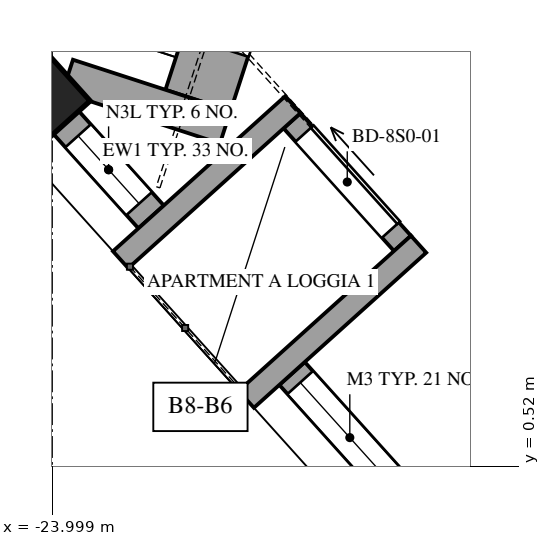
"""IFC4 building model, lengths in metres.
Left out: names, types, materials, properties, quantities, classifications, styles, units other than length and angle.
Written with IfcOpenShell. Run it as: python <this file> out.ifc"""

import sys

from ifc_helpers import new_model, si_unit, direction, frame, frame_2d, origin, origin_2d, place, context, subcontext, project, spatial, rectangle, extrude, element, fill, save


model = new_model("IFC4")
c1 = context("Model", 3, precision=1e-05, world=origin(), true_north=direction((0.0, 1.0)))
c2 = subcontext(c1, "Body", "Model", "MODEL_VIEW")
j1 = project(units=[si_unit("LENGTHUNIT", "METRE"), si_unit("PLANEANGLEUNIT", "RADIAN")], contexts=[c1])
p1 = place(None, origin())
s1 = spatial("IfcSite", under=j1, at=p1, CompositionType="ELEMENT")
p2 = place(p1, origin())
s2 = spatial("IfcBuilding", under=s1, at=p2, CompositionType="ELEMENT")
p3 = place(p2, frame((0.0, 0.0, 320.4)))
s3 = spatial("IfcBuildingStorey", under=s2, at=p3, CompositionType="ELEMENT", Elevation=320.4)
p4 = place(p3, frame((-24.278, 5.368, -0.35), z_axis=(0.0, 0.0, 1.0), x_axis=(0.669130606359, -0.743144825477, 0.0)))
e1 = element("IfcColumn", 1, at=p4, inside=s3, PredefinedType="COLUMN", context=c2, shape_type="SweptSolid", body=[
    extrude(rectangle(XDim=1.1, YDim=1.1, at=origin_2d()), origin(), (0.0, 0.0, 1.0), 4.35),
])
p5 = place(p3, frame((-23.817, 5.043, 0.0), z_axis=(0.0, 0.0, 1.0), x_axis=(0.669182609054, -0.743097998746, 0.0)))
e2 = element("IfcWall", 2, at=p5, inside=s3, PredefinedType="SOLIDWALL", context=c2, shape_type="SweptSolid", body=[
    extrude(rectangle(XDim=1.671, YDim=0.45, at=frame_2d((0.836, 0.0))), origin(), (0.0, 0.0, 1.0), 3.3),
])
p6 = place(p5, frame((0.236, 0.0, 0.4)))
e3 = element("IfcOpeningElement", 3, at=p6, cuts=e2, PredefinedType="OPENING", context=c2, shape_type="SweptSolid", body=[
    extrude(rectangle(XDim=1.2, YDim=2.1, at=frame_2d((0.6, 1.05))), frame((0.0, 0.235, 0.0), z_axis=(0.0, -1.0, 0.0), x_axis=(1.0, 0.0, 0.0)), (0.0, 0.0, 1.0), 0.47),
])
p7 = place(p3, frame((-20.844, 1.742, 0.0), z_axis=(0.0, 0.0, 1.0), x_axis=(0.669160694992, -0.743117732447, 0.0)))
e4 = element("IfcWall", 4, at=p7, inside=s3, PredefinedType="SOLIDWALL", context=c2, shape_type="SweptSolid", body=[
    extrude(rectangle(XDim=2.271, YDim=0.45, at=frame_2d((1.136, 0.0))), origin(), (0.0, 0.0, 1.0), 3.3),
])
p8 = place(p7, frame((0.161, 0.0, 0.4)))
e5 = element("IfcOpeningElement", 5, at=p8, cuts=e4, PredefinedType="OPENING", context=c2, shape_type="SweptSolid", body=[
    extrude(rectangle(XDim=1.95, YDim=2.75, at=frame_2d((0.975, 1.375))), frame((0.0, 0.235, 0.0), z_axis=(0.0, -1.0, 0.0), x_axis=(1.0, 0.0, 0.0)), (0.0, 0.0, 1.0), 0.47),
])
p9 = place(p3, frame((-20.844, 5.067, 0.0), z_axis=(0.0, 0.0, 1.0), x_axis=(0.669144868344, -0.743131983681, 0.0)))
e6 = element("IfcWall", 6, at=p9, inside=s3, PredefinedType="SOLIDWALL", context=c2, shape_type="SweptSolid", body=[
    extrude(rectangle(XDim=2.171, YDim=0.3, at=frame_2d((1.085, 0.0))), origin(), (0.0, 0.0, 1.0), 3.3),
])
p10 = place(p9, frame((0.236, 0.0, 0.0)))
e7 = element("IfcOpeningElement", 7, at=p10, cuts=e6, PredefinedType="OPENING", context=c2, shape_type="SweptSolid", body=[
    extrude(rectangle(XDim=1.7, YDim=2.5, at=frame_2d((0.85, 1.25))), frame((0.0, 0.16, 0.0), z_axis=(0.0, -1.0, 0.0), x_axis=(1.0, 0.0, 0.0)), (0.0, 0.0, 1.0), 0.32),
])
for number, where, z_axis, x_axis in (
    (8, (-23.1, 3.238, 0.0), (0.0, 0.0, 1.0), (0.743, 0.669, 0.0)),
    (9, (-21.447, 1.402, 0.0), (0.0, 0.0, 1.0), (0.743, 0.669, 0.0)),
):
    element("IfcWall", number, at=place(p3, frame(where, z_axis=z_axis, x_axis=x_axis)), inside=s3, PredefinedType="SOLIDWALL", context=c2, shape_type="SweptSolid", body=[
        extrude(rectangle(XDim=3.05, YDim=0.3, at=frame_2d((1.525, 0.0))), origin(), (0.0, 0.0, 1.0), 3.3),
    ])
p11 = place(p3, frame((-22.082, 5.335, 0.0), z_axis=(0.0, 0.0, 1.0), x_axis=(0.309019824916, 0.951055596592, 0.0)))
e10 = element("IfcWall", 10, at=p11, inside=s3, PredefinedType="SOLIDWALL", context=c2, shape_type="SweptSolid", body=[
    extrude(rectangle(XDim=3.5, YDim=0.9, at=frame_2d((1.75, 0.0))), origin(), (0.0, 0.0, 1.0), 3.3),
])
p12 = place(p11, frame((0.75, 0.0, 0.0)))
e11 = element("IfcOpeningElement", 11, at=p12, cuts=e10, PredefinedType="OPENING", context=c2, shape_type="SweptSolid", body=[
    extrude(rectangle(XDim=2.0, YDim=2.4, at=frame_2d((1.0, 1.2))), frame((0.0, 0.46, 0.0), z_axis=(0.0, -1.0, 0.0), x_axis=(1.0, 0.0, 0.0)), (0.0, 0.0, 1.0), 0.92),
])
p13 = place(p3, frame((-23.796, 5.655, 0.0), z_axis=(0.0, 0.0, 1.0), x_axis=(0.951064526973, -0.308992338955, 0.0)))
e12 = element("IfcWall", 12, at=p13, inside=s3, PredefinedType="SOLIDWALL", context=c2, shape_type="SweptSolid", body=[
    extrude(rectangle(XDim=2.179, YDim=0.45, at=frame_2d((1.09, 0.0))), origin(), (0.0, 0.0, 1.0), 2.55),
])
p14 = place(p6, origin())
e13 = element("IfcWindow", 13, at=p14, inside=s3, PartitioningType="SINGLE_PANEL", PredefinedType="WINDOW", context=c2, shape_type="SweptSolid", body=[
    extrude(rectangle(XDim=1.2, YDim=2.1, at=frame_2d((0.6, 1.05))), frame((0.0, 0.03, 0.0), z_axis=(0.0, -1.0, 0.0), x_axis=(1.0, 0.0, 0.0)), (0.0, 0.0, 1.0), 0.06),
])
fill(e3, e13)
p15 = place(p8, origin())
e14 = element("IfcWindow", 14, at=p15, inside=s3, PartitioningType="SINGLE_PANEL", PredefinedType="WINDOW", context=c2, shape_type="SweptSolid", body=[
    extrude(rectangle(XDim=1.95, YDim=2.75, at=frame_2d((0.975, 1.375))), frame((0.0, 0.03, 0.0), z_axis=(0.0, -1.0, 0.0), x_axis=(1.0, 0.0, 0.0)), (0.0, 0.0, 1.0), 0.06),
])
fill(e5, e14)
p16 = place(p10, origin())
e15 = element("IfcDoor", 15, at=p16, inside=s3, OperationType="SLIDING_TO_LEFT", PredefinedType="DOOR", context=c2, shape_type="SweptSolid", body=[
    extrude(rectangle(XDim=1.7, YDim=2.5, at=frame_2d((0.85, 1.25))), frame((0.0, 0.025, 0.0), z_axis=(0.0, -1.0, 0.0), x_axis=(1.0, 0.0, 0.0)), (0.0, 0.0, 1.0), 0.05),
])
fill(e7, e15)
save(model, sys.argv[1])
